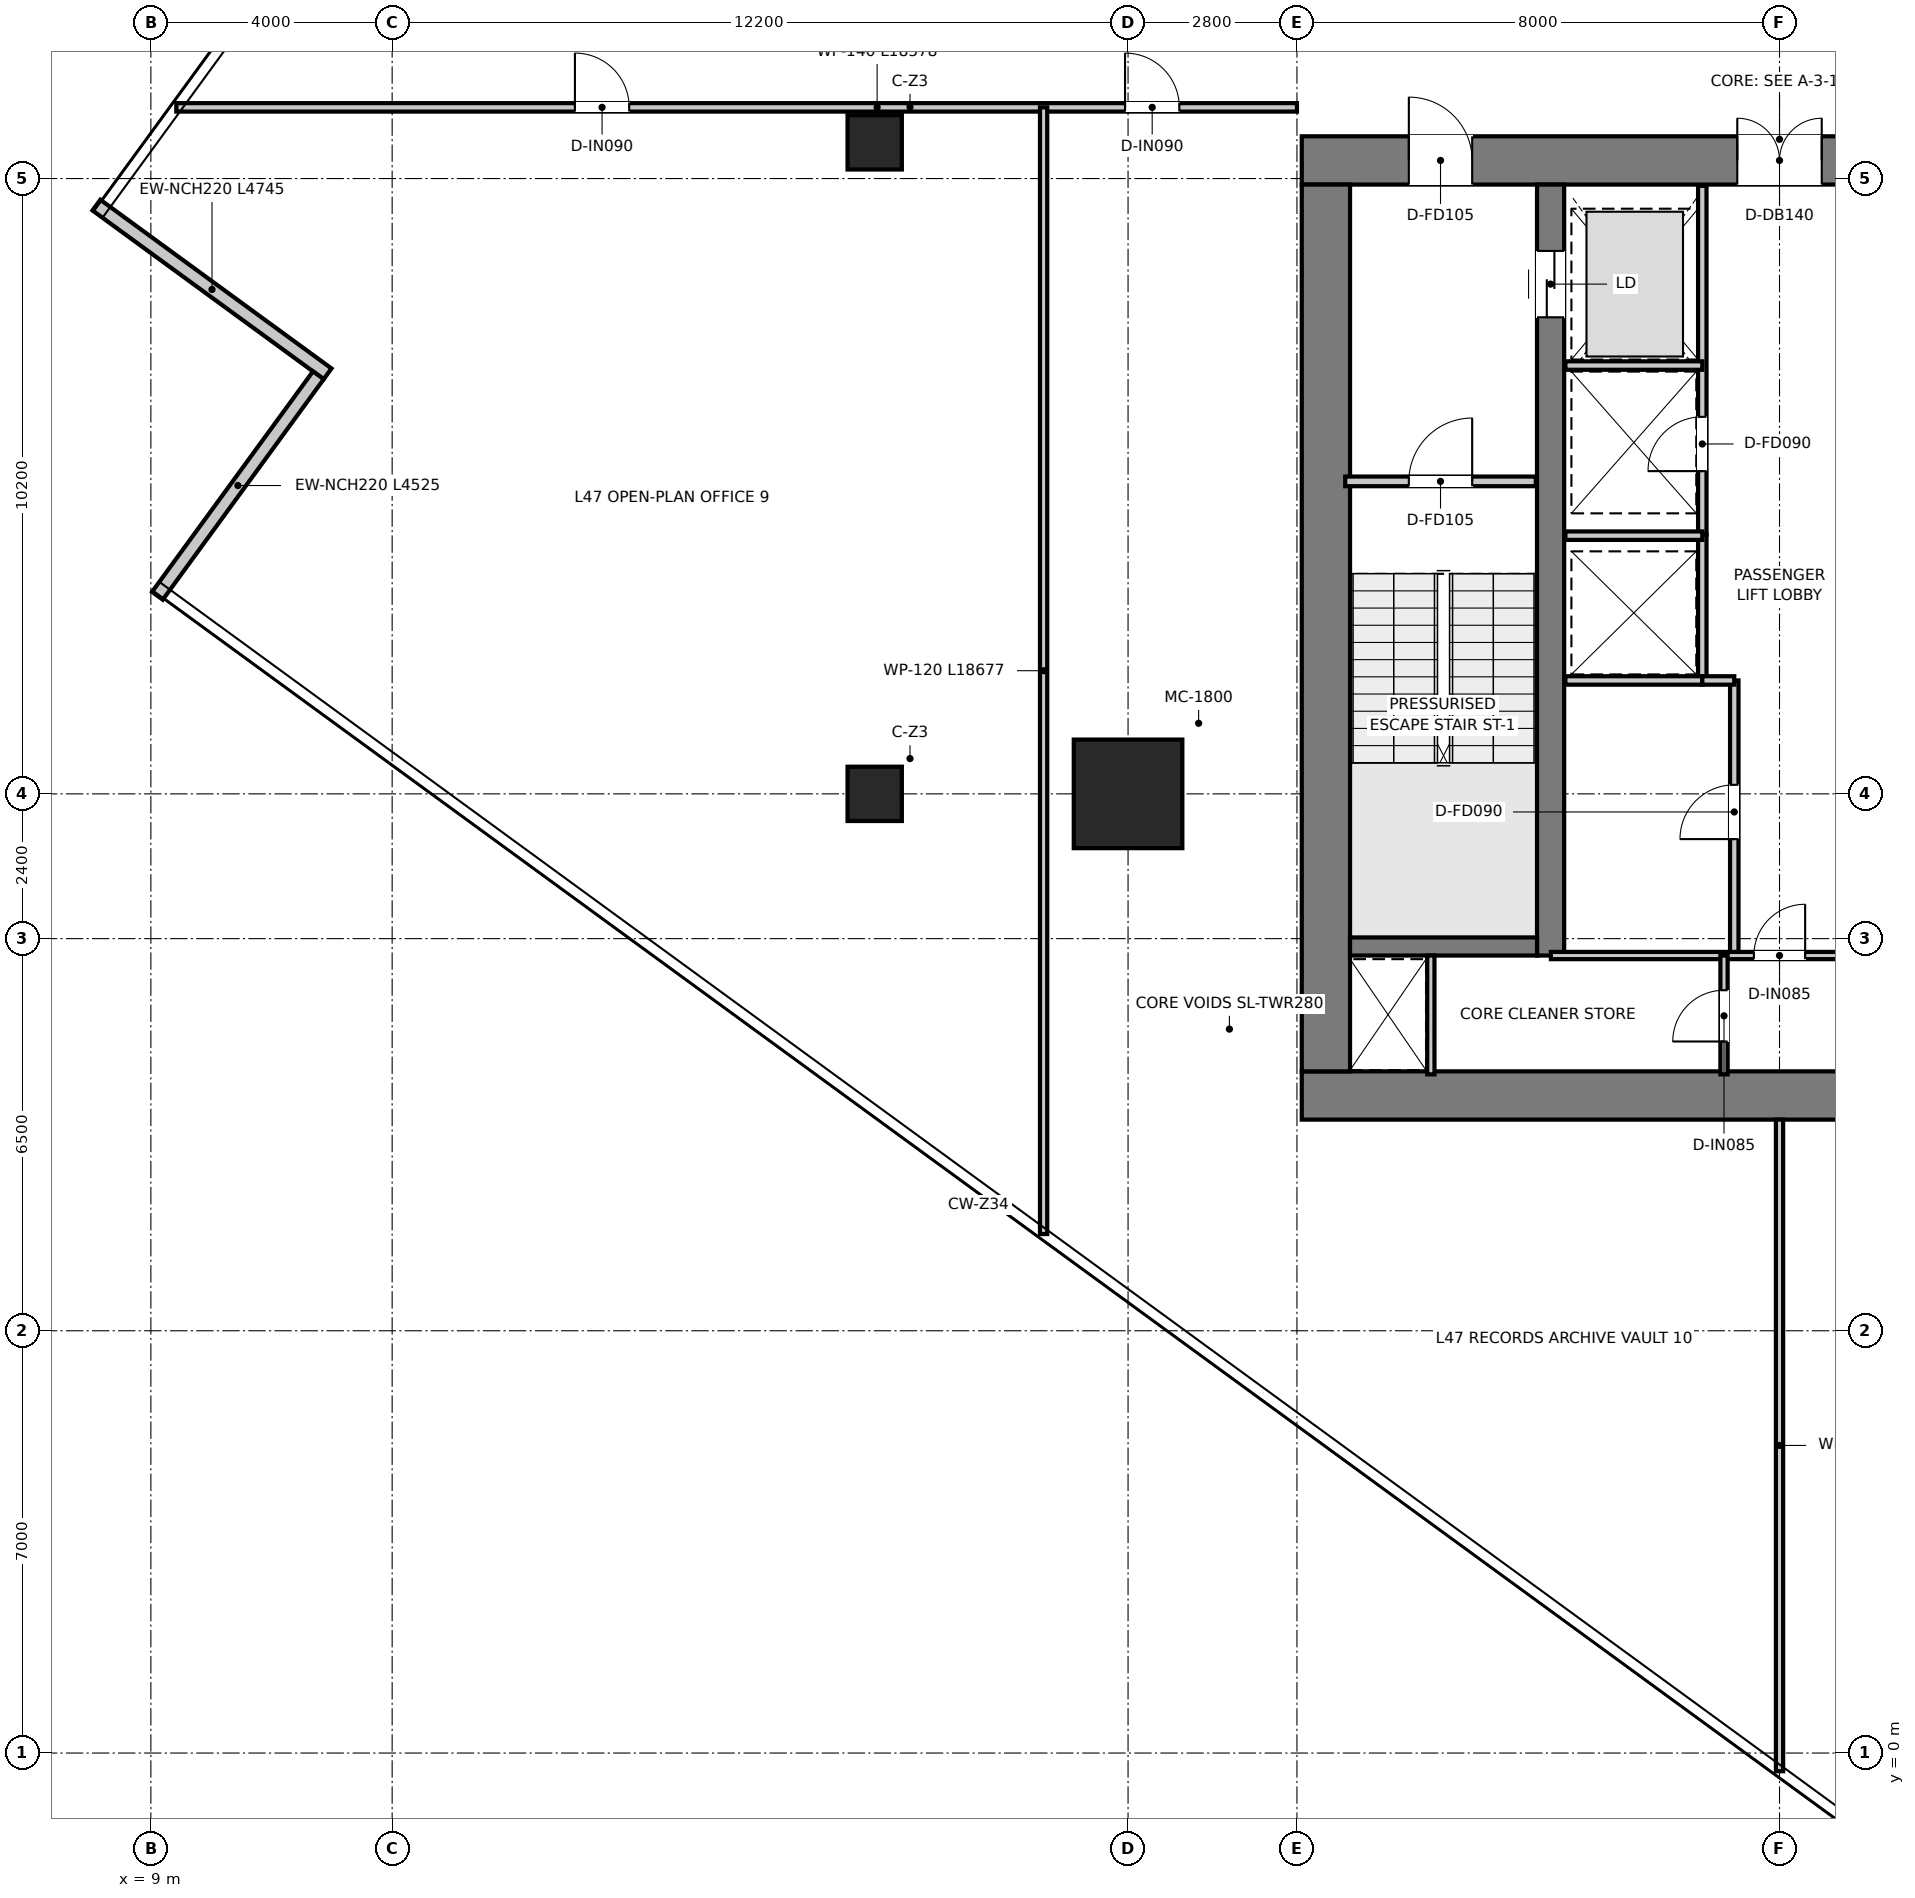
"""IFC4 building model, lengths in metres.
Left out: names, types, materials, properties, quantities, classifications, styles, units other than length and angle.
Written with IfcOpenShell. Run it as: python <this file> out.ifc"""

import sys

from ifc_helpers import new_model, si_unit, direction, frame, frame_2d, origin, origin_2d, place, context, subcontext, project, spatial, rectangle, extrude, source, transform, mapped, element, fill, save


model = new_model("IFC4")
c1 = context("Model", 3, precision=1e-05, world=origin(), true_north=direction((0.0, 1.0)))
c2 = subcontext(c1, "Body", "Model", "MODEL_VIEW")
j1 = project(units=[si_unit("LENGTHUNIT", "METRE"), si_unit("PLANEANGLEUNIT", "RADIAN")], contexts=[c1])
p1 = place(None, origin())
s1 = spatial("IfcSite", under=j1, at=p1, CompositionType="ELEMENT")
p2 = place(p1, origin())
s2 = spatial("IfcBuilding", under=s1, at=p2, CompositionType="ELEMENT")
p3 = place(p2, frame((0.0, 0.0, 193.6)))
s3 = spatial("IfcBuildingStorey", under=s2, at=p3, CompositionType="ELEMENT", Elevation=193.6)
p4 = place(p3, frame((28.08, 10.9, 0.0), z_axis=(0.0, 0.0, 1.0), x_axis=(1.0, 0.0, 0.0)))
e1 = element("IfcWall", 1, at=p4, inside=s3, PredefinedType="SHEAR", context=c2, shape_type="SweptSolid", body=[
    extrude(rectangle(XDim=15.84, YDim=0.8, at=frame_2d((7.92, 0.0))), origin(), (0.0, 0.0, 1.0), 3.95),
])
p5 = place(p3, frame((28.08, 26.4, 0.0), z_axis=(0.0, 0.0, 1.0), x_axis=(1.0, 0.0, 0.0)))
e2 = element("IfcWall", 2, at=p5, inside=s3, PredefinedType="SHEAR", context=c2, shape_type="SweptSolid", body=[
    extrude(rectangle(XDim=15.84, YDim=0.8, at=frame_2d((7.92, 0.0))), origin(), (0.0, 0.0, 1.0), 3.95),
])
p6 = place(p5, frame((7.22, 0.0, 0.0)))
e3 = element("IfcOpeningElement", 3, at=p6, cuts=e2, PredefinedType="OPENING", context=c2, shape_type="SweptSolid", body=[
    extrude(rectangle(XDim=1.4, YDim=2.2, at=frame_2d((0.7, 1.1))), frame((0.0, 0.41, 0.0), z_axis=(0.0, -1.0, 0.0), x_axis=(1.0, 0.0, 0.0)), (0.0, 0.0, 1.0), 0.82),
])
p7 = place(p5, frame((1.775, 0.0, 0.0)))
e4 = element("IfcOpeningElement", 4, at=p7, cuts=e2, PredefinedType="OPENING", context=c2, shape_type="SweptSolid", body=[
    extrude(rectangle(XDim=1.05, YDim=2.1, at=frame_2d((0.525, 1.05))), frame((0.0, 0.41, 0.0), z_axis=(0.0, -1.0, 0.0), x_axis=(1.0, 0.0, 0.0)), (0.0, 0.0, 1.0), 0.82),
])
p8 = place(p5, frame((13.015, 0.0, 0.0)))
e5 = element("IfcOpeningElement", 5, at=p8, cuts=e2, PredefinedType="OPENING", context=c2, shape_type="SweptSolid", body=[
    extrude(rectangle(XDim=1.05, YDim=2.1, at=frame_2d((0.525, 1.05))), frame((0.0, 0.41, 0.0), z_axis=(0.0, -1.0, 0.0), x_axis=(1.0, 0.0, 0.0)), (0.0, 0.0, 1.0), 0.82),
])
p9 = place(p3, frame((28.48, 11.3, 0.0), z_axis=(0.0, 0.0, 1.0), x_axis=(0.0, 1.0, 0.0)))
e6 = element("IfcWall", 6, at=p9, inside=s3, PredefinedType="SHEAR", context=c2, shape_type="SweptSolid", body=[
    extrude(rectangle(XDim=14.7, YDim=0.8, at=frame_2d((7.35, 0.0))), origin(), (0.0, 0.0, 1.0), 3.95),
])
p10 = place(p3, frame((32.205, 13.22, 0.0), z_axis=(0.0, 0.0, 1.0), x_axis=(0.0, 1.0, 0.0)))
e7 = element("IfcWall", 7, at=p10, inside=s3, PredefinedType="SHEAR", context=c2, shape_type="SweptSolid", body=[
    extrude(rectangle(XDim=12.78, YDim=0.45, at=frame_2d((6.39, 0.0))), origin(), (0.0, 0.0, 1.0), 3.95),
])
p11 = place(p10, frame((10.58, 0.0, 0.0)))
e8 = element("IfcOpeningElement", 8, at=p11, cuts=e7, PredefinedType="OPENING", context=c2, shape_type="SweptSolid", body=[
    extrude(rectangle(XDim=1.1, YDim=2.15, at=frame_2d((0.55, 1.075))), frame((0.0, 0.235, 0.0), z_axis=(0.0, -1.0, 0.0), x_axis=(1.0, 0.0, 0.0)), (0.0, 0.0, 1.0), 0.47),
])
p12 = place(p3, frame((28.88, 13.37, 0.0), z_axis=(0.0, 0.0, 1.0), x_axis=(1.0, 0.0, 0.0)))
e9 = element("IfcWall", 9, at=p12, inside=s3, PredefinedType="SHEAR", context=c2, shape_type="SweptSolid", body=[
    extrude(rectangle(XDim=3.1, YDim=0.3, at=frame_2d((1.55, 0.0))), origin(), (0.0, 0.0, 1.0), 3.95),
])
m1 = source(origin(), c2, "Body", "SweptSolid", [
    extrude(rectangle(XDim=1.8, YDim=1.8, at=origin_2d()), origin(), (0.0, 0.0, 1.0), 3.95),
])
p13 = place(p3, frame((25.2, 15.9, 0.0), z_axis=(0.0, 0.0, 1.0), x_axis=(1.0, 0.0, 0.0)))
e10 = element("IfcColumn", 10, at=p13, inside=s3, PredefinedType="USERDEFINED", context=c2, shape_type="MappedRepresentation", body=[
    mapped(m1, transform((0.0, 0.0, 0.0), x_axis=(1.0, 0.0, 0.0), y_axis=(0.0, 1.0, 0.0), z_axis=(0.0, 0.0, 1.0), scale=1.0)),
])
m2 = source(origin(), c2, "Body", "SweptSolid", [
    extrude(rectangle(XDim=0.9, YDim=0.9, at=origin_2d()), origin(), (0.0, 0.0, 1.0), 3.95),
])
for number, where, z_axis, x_axis in (
    (11, (21.0, 15.9, 0.0), (0.0, 0.0, 1.0), (1.0, 0.0, 0.0)),
    (12, (21.0, 26.7, 0.0), (0.0, 0.0, 1.0), (1.0, 0.0, 0.0)),
):
    element("IfcColumn", number, at=place(p3, frame(where, z_axis=z_axis, x_axis=x_axis)), inside=s3, PredefinedType="COLUMN", context=c2, shape_type="MappedRepresentation", body=[
        mapped(m2, transform((0.0, 0.0, 0.0), x_axis=(1.0, 0.0, 0.0), y_axis=(0.0, 1.0, 0.0), z_axis=(0.0, 0.0, 1.0), scale=1.0)),
    ])
p14 = place(p3, frame((8.097, 25.66, 0.0), z_axis=(0.0, 0.0, 1.0), x_axis=(0.807742607871, -0.589535308044, 0.0)))
e13 = element("IfcWall", 13, at=p14, inside=s3, PredefinedType="ELEMENTEDWALL", context=c2, shape_type="SweptSolid", body=[
    extrude(rectangle(XDim=4.745, YDim=0.22, at=frame_2d((2.373, 0.0))), origin(), (0.0, 0.0, 1.0), 3.67),
])
p15 = place(p3, frame((11.776, 22.839, 0.0), z_axis=(0.0, 0.0, 1.0), x_axis=(-0.589547091209, -0.807734007732, 0.0)))
e14 = element("IfcWall", 14, at=p15, inside=s3, PredefinedType="ELEMENTEDWALL", context=c2, shape_type="SweptSolid", body=[
    extrude(rectangle(XDim=4.525, YDim=0.22, at=frame_2d((2.263, 0.0))), origin(), (0.0, 0.0, 1.0), 3.67),
])
p16 = place(p3, frame((28.8, 21.08, 0.0), z_axis=(0.0, 0.0, 1.0), x_axis=(1.0, 0.0, 0.0)))
e15 = element("IfcWall", 15, at=p16, inside=s3, PredefinedType="PARTITIONING", context=c2, shape_type="SweptSolid", body=[
    extrude(rectangle(XDim=3.16, YDim=0.16, at=frame_2d((1.58, 0.0))), origin(), (0.0, 0.0, 1.0), 3.67),
])
p17 = place(p16, frame((1.055, 0.0, 0.0)))
e16 = element("IfcOpeningElement", 16, at=p17, cuts=e15, PredefinedType="OPENING", context=c2, shape_type="SweptSolid", body=[
    extrude(rectangle(XDim=1.05, YDim=2.1, at=frame_2d((0.525, 1.05))), frame((0.0, 0.09, 0.0), z_axis=(0.0, -1.0, 0.0), x_axis=(1.0, 0.0, 0.0)), (0.0, 0.0, 1.0), 0.18),
])
p18 = place(p3, frame((34.72, 20.2, 0.0), z_axis=(0.0, 0.0, 1.0), x_axis=(0.0, 1.0, 0.0)))
e17 = element("IfcWall", 17, at=p18, inside=s3, PredefinedType="PARTITIONING", context=c2, shape_type="SweptSolid", body=[
    extrude(rectangle(XDim=5.78, YDim=0.14, at=frame_2d((2.89, 0.0))), origin(), (0.0, 0.0, 1.0), 2.67),
])
p19 = place(p18, frame((1.05, 0.0, 0.0)))
e18 = element("IfcOpeningElement", 18, at=p19, cuts=e17, PredefinedType="OPENING", context=c2, shape_type="SweptSolid", body=[
    extrude(rectangle(XDim=0.9, YDim=2.1, at=frame_2d((0.45, 1.05))), frame((0.0, 0.08, 0.0), z_axis=(0.0, -1.0, 0.0), x_axis=(1.0, 0.0, 0.0)), (0.0, 0.0, 1.0), 0.16),
])
p20 = place(p3, frame((32.45, 23.0, 0.0), z_axis=(0.0, 0.0, 1.0), x_axis=(1.0, 0.0, 0.0)))
e19 = element("IfcWall", 19, at=p20, inside=s3, PredefinedType="PARTITIONING", context=c2, shape_type="SweptSolid", body=[
    extrude(rectangle(XDim=2.27, YDim=0.14, at=frame_2d((1.135, 0.0))), origin(), (0.0, 0.0, 1.0), 2.67),
])
p21 = place(p3, frame((34.72, 17.78, 0.0), z_axis=(0.0, 0.0, 1.0), x_axis=(0.0, 1.0, 0.0)))
e20 = element("IfcWall", 20, at=p21, inside=s3, PredefinedType="PARTITIONING", context=c2, shape_type="SweptSolid", body=[
    extrude(rectangle(XDim=2.42, YDim=0.14, at=frame_2d((1.21, 0.0))), origin(), (0.0, 0.0, 1.0), 3.67),
])
for number, where, z_axis, x_axis in (
    (21, (32.45, 17.78, 0.0), (0.0, 0.0, 1.0), (1.0, 0.0, 0.0)),
    (22, (32.45, 20.18, 0.0), (0.0, 0.0, 1.0), (1.0, 0.0, 0.0)),
):
    element("IfcWall", number, at=place(p3, frame(where, z_axis=z_axis, x_axis=x_axis)), inside=s3, PredefinedType="PARTITIONING", context=c2, shape_type="SweptSolid", body=[
        extrude(rectangle(XDim=2.27, YDim=0.14, at=frame_2d((1.135, 0.0))), origin(), (0.0, 0.0, 1.0), 3.67),
    ])
p22 = place(p3, frame((35.25, 13.22, 0.0), z_axis=(0.0, 0.0, 1.0), x_axis=(0.0, 1.0, 0.0)))
e23 = element("IfcWall", 23, at=p22, inside=s3, PredefinedType="PARTITIONING", context=c2, shape_type="SweptSolid", body=[
    extrude(rectangle(XDim=4.56, YDim=0.14, at=frame_2d((2.28, 0.0))), origin(), (0.0, 0.0, 1.0), 3.67),
])
p23 = place(p22, frame((1.93, 0.0, 0.0)))
e24 = element("IfcOpeningElement", 24, at=p23, cuts=e23, PredefinedType="OPENING", context=c2, shape_type="SweptSolid", body=[
    extrude(rectangle(XDim=0.9, YDim=2.1, at=frame_2d((0.45, 1.05))), frame((0.0, 0.08, 0.0), z_axis=(0.0, -1.0, 0.0), x_axis=(1.0, 0.0, 0.0)), (0.0, 0.0, 1.0), 0.16),
])
p24 = place(p3, frame((34.72, 17.78, 0.0), z_axis=(0.0, 0.0, 1.0), x_axis=(1.0, 0.0, 0.0)))
e25 = element("IfcWall", 25, at=p24, inside=s3, PredefinedType="PARTITIONING", context=c2, shape_type="SweptSolid", body=[
    extrude(rectangle(XDim=0.53, YDim=0.14, at=frame_2d((0.265, 0.0))), origin(), (0.0, 0.0, 1.0), 3.67),
])
p25 = place(p3, frame((30.22, 11.25, 0.0), z_axis=(0.0, 0.0, 1.0), x_axis=(0.0, 1.0, 0.0)))
e26 = element("IfcWall", 26, at=p25, inside=s3, PredefinedType="PARTITIONING", context=c2, shape_type="SweptSolid", body=[
    extrude(rectangle(XDim=1.97, YDim=0.12, at=frame_2d((0.985, 0.0))), origin(), (0.0, 0.0, 1.0), 3.67),
])
p26 = place(p3, frame((32.21, 13.22, 0.0), z_axis=(0.0, 0.0, 1.0), x_axis=(1.0, 0.0, 0.0)))
e27 = element("IfcWall", 27, at=p26, inside=s3, PredefinedType="PARTITIONING", context=c2, shape_type="SweptSolid", body=[
    extrude(rectangle(XDim=7.58, YDim=0.12, at=frame_2d((3.79, 0.0))), origin(), (0.0, 0.0, 1.0), 3.67),
])
p27 = place(p26, frame((3.365, 0.0, 0.0)))
e28 = element("IfcOpeningElement", 28, at=p27, cuts=e27, PredefinedType="OPENING", context=c2, shape_type="SweptSolid", body=[
    extrude(rectangle(XDim=0.85, YDim=2.1, at=frame_2d((0.425, 1.05))), frame((0.0, 0.07, 0.0), z_axis=(0.0, -1.0, 0.0), x_axis=(1.0, 0.0, 0.0)), (0.0, 0.0, 1.0), 0.14),
])
p28 = place(p3, frame((35.08, 11.25, 0.0), z_axis=(0.0, 0.0, 1.0), x_axis=(0.0, 1.0, 0.0)))
e29 = element("IfcWall", 29, at=p28, inside=s3, PredefinedType="PARTITIONING", context=c2, shape_type="SweptSolid", body=[
    extrude(rectangle(XDim=1.97, YDim=0.12, at=frame_2d((0.985, 0.0))), origin(), (0.0, 0.0, 1.0), 3.67),
])
p29 = place(p28, frame((0.545, 0.0, 0.0)))
e30 = element("IfcOpeningElement", 30, at=p29, cuts=e29, PredefinedType="OPENING", context=c2, shape_type="SweptSolid", body=[
    extrude(rectangle(XDim=0.85, YDim=2.1, at=frame_2d((0.425, 1.05))), frame((0.0, 0.07, 0.0), z_axis=(0.0, -1.0, 0.0), x_axis=(1.0, 0.0, 0.0)), (0.0, 0.0, 1.0), 0.14),
])
p30 = place(p3, frame((9.422, 27.28, 0.0), z_axis=(0.0, 0.0, 1.0), x_axis=(1.0, 0.0, 0.0)))
e31 = element("IfcWall", 31, at=p30, inside=s3, PredefinedType="PARTITIONING", context=c2, shape_type="SweptSolid", body=[
    extrude(rectangle(XDim=18.578, YDim=0.14, at=frame_2d((9.289, 0.0))), origin(), (0.0, 0.0, 1.0), 3.03),
])
p31 = place(p30, frame((6.608, 0.0, 0.0)))
e32 = element("IfcOpeningElement", 32, at=p31, cuts=e31, PredefinedType="OPENING", context=c2, shape_type="SweptSolid", body=[
    extrude(rectangle(XDim=0.9, YDim=2.1, at=frame_2d((0.45, 1.05))), frame((0.0, 0.08, 0.0), z_axis=(0.0, -1.0, 0.0), x_axis=(1.0, 0.0, 0.0)), (0.0, 0.0, 1.0), 0.16),
])
p32 = place(p30, frame((15.728, 0.0, 0.0)))
e33 = element("IfcOpeningElement", 33, at=p32, cuts=e31, PredefinedType="OPENING", context=c2, shape_type="SweptSolid", body=[
    extrude(rectangle(XDim=0.9, YDim=2.1, at=frame_2d((0.45, 1.05))), frame((0.0, 0.08, 0.0), z_axis=(0.0, -1.0, 0.0), x_axis=(1.0, 0.0, 0.0)), (0.0, 0.0, 1.0), 0.16),
])
p33 = place(p3, frame((36.0, -0.302, 0.0), z_axis=(0.0, 0.0, 1.0), x_axis=(0.0, 1.0, 0.0)))
e34 = element("IfcWall", 34, at=p33, inside=s3, PredefinedType="PARTITIONING", context=c2, shape_type="SweptSolid", body=[
    extrude(rectangle(XDim=10.802, YDim=0.12, at=frame_2d((5.401, 0.0))), origin(), (0.0, 0.0, 1.0), 3.67),
])
p34 = place(p3, frame((23.8, 8.603, 0.0), z_axis=(0.0, 0.0, 1.0), x_axis=(0.0, 1.0, 0.0)))
e35 = element("IfcWall", 35, at=p34, inside=s3, PredefinedType="PARTITIONING", context=c2, shape_type="SweptSolid", body=[
    extrude(rectangle(XDim=18.677, YDim=0.12, at=frame_2d((9.338, 0.0))), origin(), (0.0, 0.0, 1.0), 3.08),
])
p35 = place(p17, origin())
e36 = element("IfcDoor", 36, at=p35, inside=s3, OperationType="SINGLE_SWING_RIGHT", PredefinedType="DOOR", context=c2, shape_type="SweptSolid", body=[
    extrude(rectangle(XDim=1.05, YDim=2.1, at=frame_2d((0.525, 1.05))), frame((0.0, 0.025, 0.0), z_axis=(0.0, -1.0, 0.0), x_axis=(1.0, 0.0, 0.0)), (0.0, 0.0, 1.0), 0.05),
])
fill(e16, e36)
p36 = place(p6, origin())
e37 = element("IfcDoor", 37, at=p36, inside=s3, OperationType="DOUBLE_DOOR_SINGLE_SWING", PredefinedType="DOOR", context=c2, shape_type="SweptSolid", body=[
    extrude(rectangle(XDim=1.4, YDim=2.2, at=frame_2d((0.7, 1.1))), frame((0.0, 0.025, 0.0), z_axis=(0.0, -1.0, 0.0), x_axis=(1.0, 0.0, 0.0)), (0.0, 0.0, 1.0), 0.05),
])
fill(e3, e37)
p37 = place(p7, origin())
e38 = element("IfcDoor", 38, at=p37, inside=s3, OperationType="SINGLE_SWING_LEFT", PredefinedType="DOOR", context=c2, shape_type="SweptSolid", body=[
    extrude(rectangle(XDim=1.05, YDim=2.1, at=frame_2d((0.525, 1.05))), frame((0.0, 0.025, 0.0), z_axis=(0.0, -1.0, 0.0), x_axis=(1.0, 0.0, 0.0)), (0.0, 0.0, 1.0), 0.05),
])
fill(e4, e38)
p38 = place(p11, origin())
e39 = element("IfcDoor", 39, at=p38, inside=s3, OperationType="DOUBLE_DOOR_SLIDING", PredefinedType="DOOR", context=c2, shape_type="SweptSolid", body=[
    extrude(rectangle(XDim=1.1, YDim=2.15, at=frame_2d((0.55, 1.075))), frame((0.0, 0.025, 0.0), z_axis=(0.0, -1.0, 0.0), x_axis=(1.0, 0.0, 0.0)), (0.0, 0.0, 1.0), 0.05),
])
fill(e8, e39)
p39 = place(p19, origin())
e40 = element("IfcDoor", 40, at=p39, inside=s3, OperationType="SINGLE_SWING_LEFT", PredefinedType="DOOR", context=c2, shape_type="SweptSolid", body=[
    extrude(rectangle(XDim=0.9, YDim=2.1, at=frame_2d((0.45, 1.05))), frame((0.0, 0.025, 0.0), z_axis=(0.0, -1.0, 0.0), x_axis=(1.0, 0.0, 0.0)), (0.0, 0.0, 1.0), 0.05),
])
fill(e18, e40)
p40 = place(p23, origin())
e41 = element("IfcDoor", 41, at=p40, inside=s3, OperationType="SINGLE_SWING_LEFT", PredefinedType="DOOR", context=c2, shape_type="SweptSolid", body=[
    extrude(rectangle(XDim=0.9, YDim=2.1, at=frame_2d((0.45, 1.05))), frame((0.0, 0.025, 0.0), z_axis=(0.0, -1.0, 0.0), x_axis=(1.0, 0.0, 0.0)), (0.0, 0.0, 1.0), 0.05),
])
fill(e24, e41)
p41 = place(p27, origin())
e42 = element("IfcDoor", 42, at=p41, inside=s3, OperationType="SINGLE_SWING_RIGHT", PredefinedType="DOOR", context=c2, shape_type="SweptSolid", body=[
    extrude(rectangle(XDim=0.85, YDim=2.1, at=frame_2d((0.425, 1.05))), frame((0.0, 0.025, 0.0), z_axis=(0.0, -1.0, 0.0), x_axis=(1.0, 0.0, 0.0)), (0.0, 0.0, 1.0), 0.05),
])
fill(e28, e42)
p42 = place(p29, origin())
e43 = element("IfcDoor", 43, at=p42, inside=s3, OperationType="SINGLE_SWING_LEFT", PredefinedType="DOOR", context=c2, shape_type="SweptSolid", body=[
    extrude(rectangle(XDim=0.85, YDim=2.1, at=frame_2d((0.425, 1.05))), frame((0.0, 0.025, 0.0), z_axis=(0.0, -1.0, 0.0), x_axis=(1.0, 0.0, 0.0)), (0.0, 0.0, 1.0), 0.05),
])
fill(e30, e43)
p43 = place(p31, origin())
e44 = element("IfcDoor", 44, at=p43, inside=s3, OperationType="SINGLE_SWING_LEFT", PredefinedType="DOOR", context=c2, shape_type="SweptSolid", body=[
    extrude(rectangle(XDim=0.9, YDim=2.1, at=frame_2d((0.45, 1.05))), frame((0.0, 0.025, 0.0), z_axis=(0.0, -1.0, 0.0), x_axis=(1.0, 0.0, 0.0)), (0.0, 0.0, 1.0), 0.05),
])
fill(e32, e44)
p44 = place(p32, origin())
e45 = element("IfcDoor", 45, at=p44, inside=s3, OperationType="SINGLE_SWING_LEFT", PredefinedType="DOOR", context=c2, shape_type="SweptSolid", body=[
    extrude(rectangle(XDim=0.9, YDim=2.1, at=frame_2d((0.45, 1.05))), frame((0.0, 0.025, 0.0), z_axis=(0.0, -1.0, 0.0), x_axis=(1.0, 0.0, 0.0)), (0.0, 0.0, 1.0), 0.05),
])
fill(e33, e45)
save(model, sys.argv[1])
